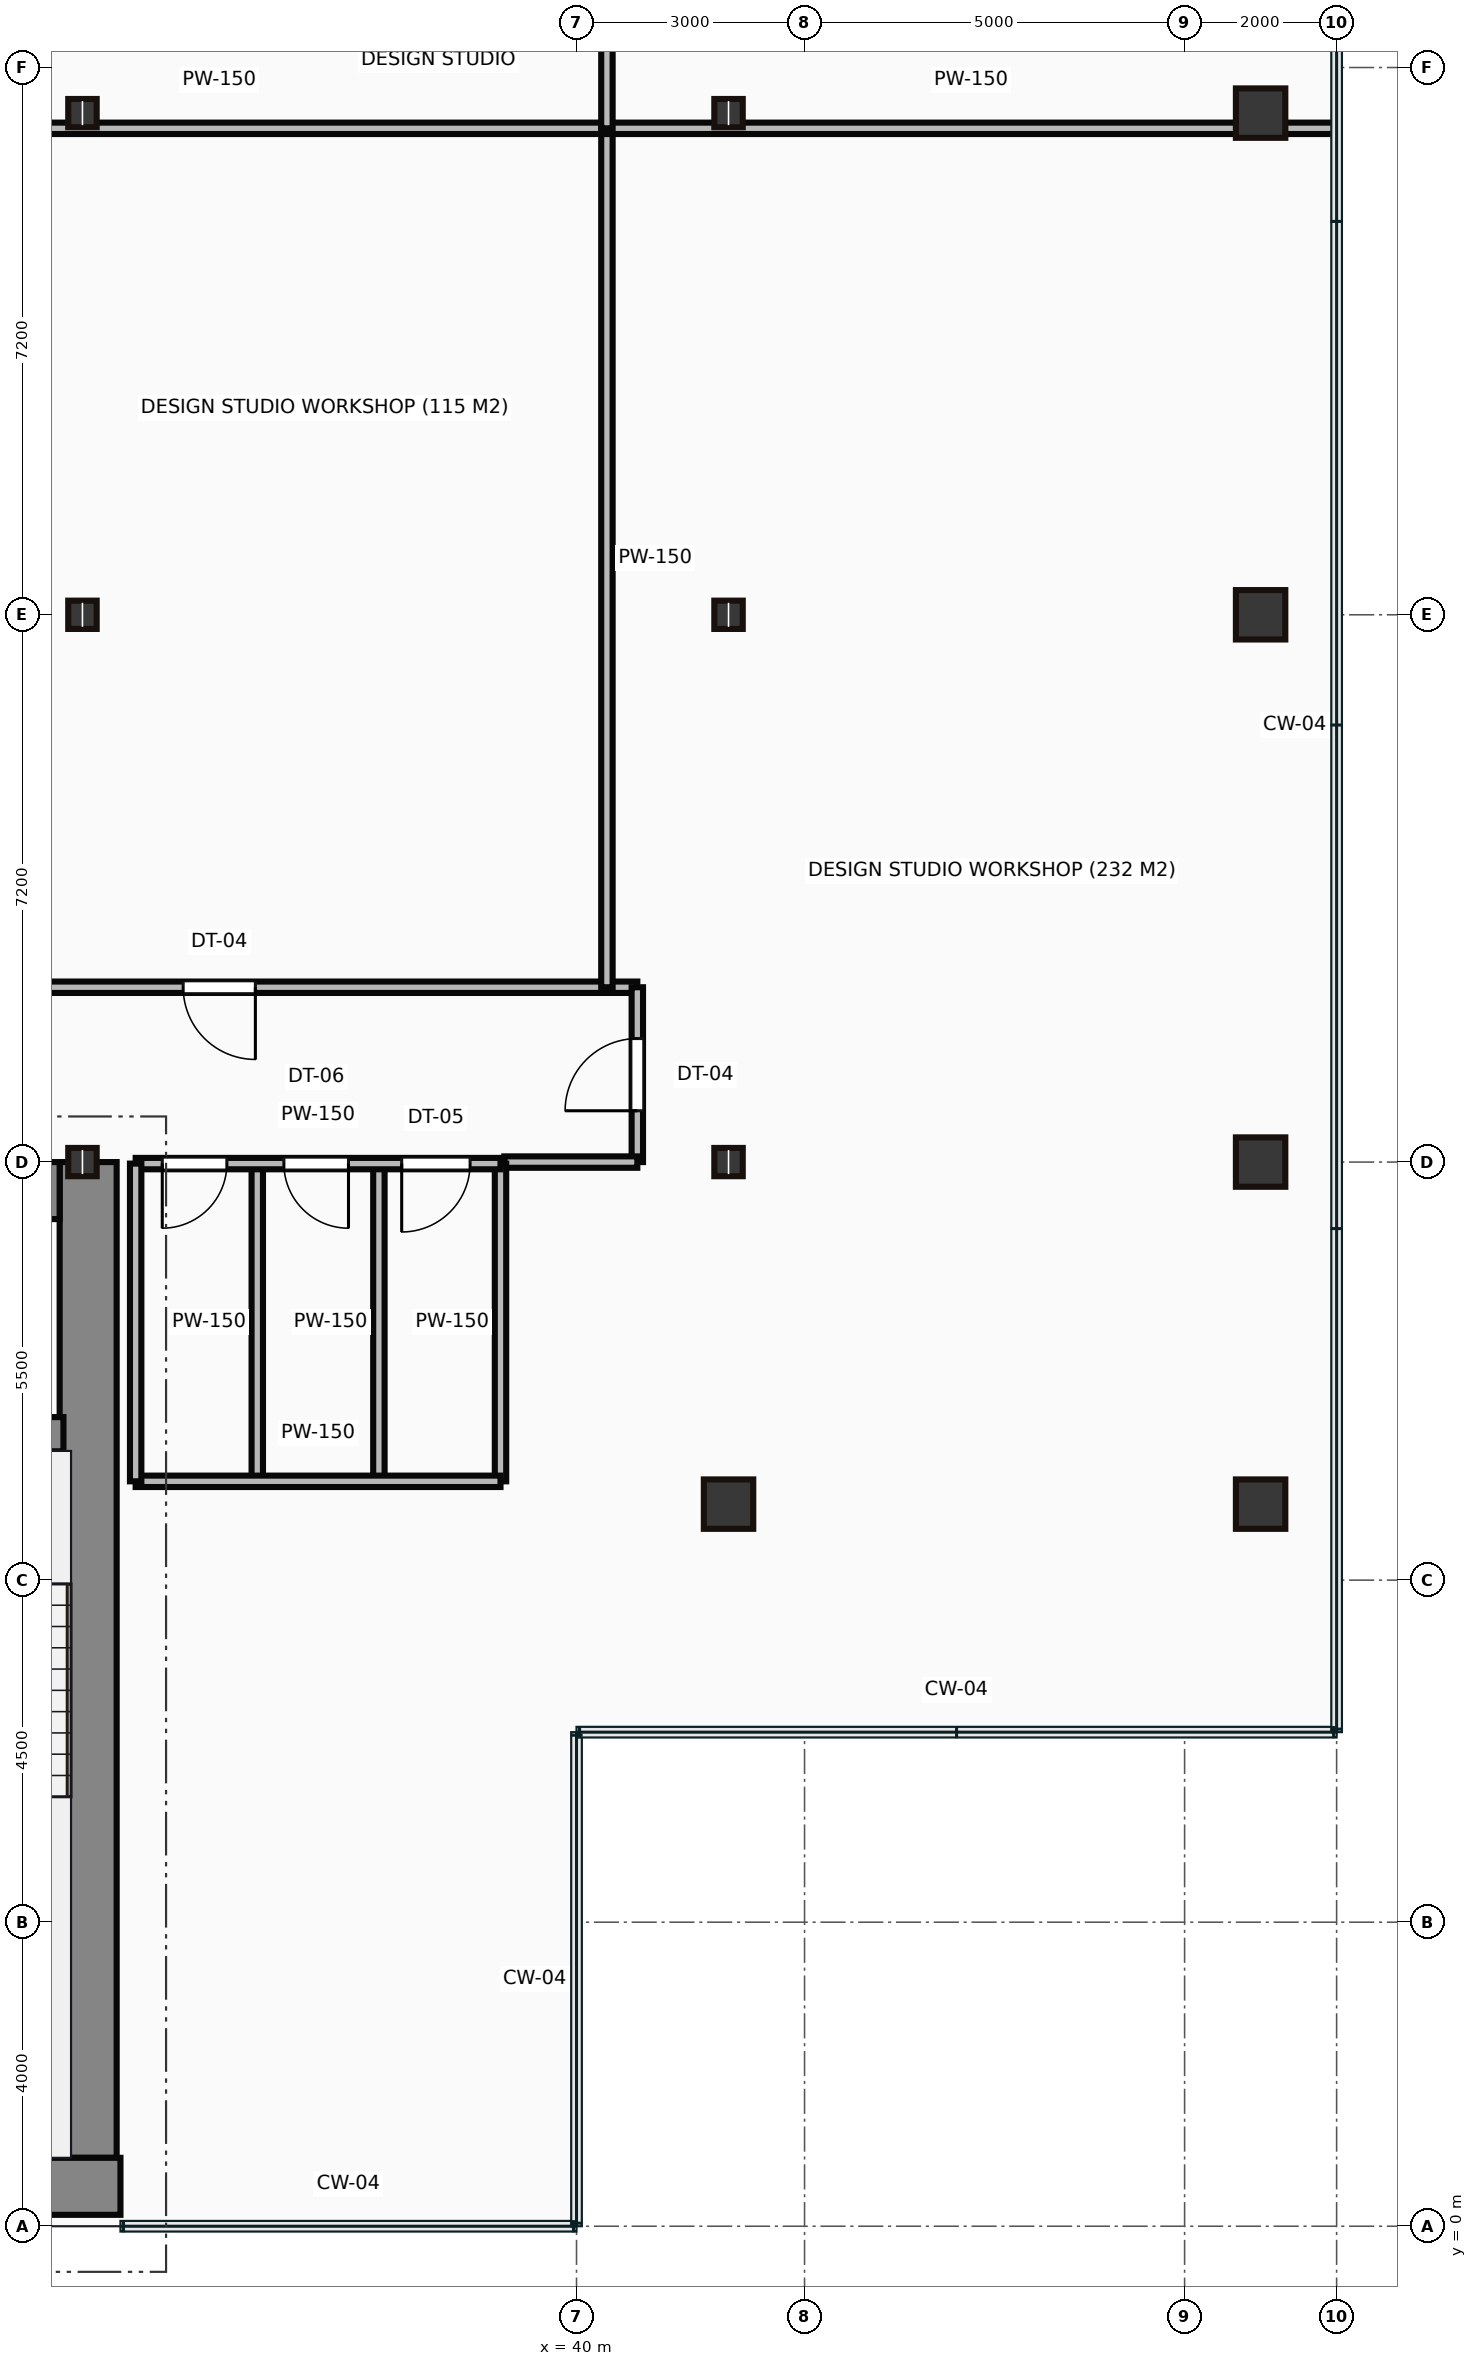
"""IFC4 building model, lengths in metres.
Left out: names, types, materials, properties, quantities, classifications, styles, units other than length and angle.
Written with IfcOpenShell. Run it as: python <this file> out.ifc"""

import sys

from ifc_helpers import new_model, si_unit, direction, frame, frame_2d, origin, origin_2d, place, context, subcontext, project, spatial, rectangle, hollow_rectangle, i_section, extrude, source, transform, mapped, element, fill, save


model = new_model("IFC4")
c1 = context("Model", 3, precision=1e-05, world=origin(), true_north=direction((0.0, 1.0)))
c2 = subcontext(c1, "Body", "Model", "MODEL_VIEW")
j1 = project(units=[si_unit("LENGTHUNIT", "METRE"), si_unit("PLANEANGLEUNIT", "RADIAN")], contexts=[c1])
p1 = place(None, origin())
s1 = spatial("IfcSite", under=j1, at=p1, CompositionType="ELEMENT")
p2 = place(p1, origin())
s2 = spatial("IfcBuilding", under=s1, at=p2, CompositionType="ELEMENT")
p3 = place(p2, frame((0.0, 0.0, 144.25)))
s3 = spatial("IfcBuildingStorey", under=s2, at=p3, CompositionType="ELEMENT", Elevation=144.25)
m1 = source(origin(), c2, "Body", "SweptSolid", [
    extrude(rectangle(XDim=29.5, YDim=0.75, at=frame_2d((14.75, 0.0))), origin(), (0.0, 0.0, 1.0), 3.65),
])
p4 = place(p3, frame((4.5, 0.525, 0.0), z_axis=(0.0, 0.0, 1.0), x_axis=(1.0, 0.0, 0.0)))
e1 = element("IfcWall", 1, at=p4, inside=s3, PredefinedType="SHEAR", context=c2, shape_type="MappedRepresentation", body=[
    mapped(m1, transform((0.0, 0.0, 0.0))),
])
m2 = source(origin(), c2, "Body", "SweptSolid", [
    extrude(rectangle(XDim=13.1, YDim=0.75, at=frame_2d((6.55, 0.0))), origin(), (0.0, 0.0, 1.0), 3.65),
])
p5 = place(p3, frame((33.575, 0.9, 0.0), z_axis=(0.0, 0.0, 1.0), x_axis=(0.0, 1.0, 0.0)))
e2 = element("IfcWall", 2, at=p5, inside=s3, PredefinedType="SHEAR", context=c2, shape_type="MappedRepresentation", body=[
    mapped(m2, transform((0.0, 0.0, 0.0))),
])
m3 = source(origin(), c2, "Body", "SweptSolid", [
    extrude(rectangle(XDim=12.6, YDim=0.75, at=frame_2d((6.3, 0.0))), origin(), (0.0, 0.0, 1.0), 3.65),
])
p6 = place(p3, frame((20.6, 13.625, 0.0), z_axis=(0.0, 0.0, 1.0), x_axis=(1.0, 0.0, 0.0)))
e3 = element("IfcWall", 3, at=p6, inside=s3, PredefinedType="SHEAR", context=c2, shape_type="MappedRepresentation", body=[
    mapped(m3, transform((0.0, 0.0, 0.0))),
])
p7 = place(p6, frame((9.25, 0.0, 0.0)))
e4 = element("IfcOpeningElement", 4, at=p7, cuts=e3, PredefinedType="OPENING", context=c2, shape_type="SweptSolid", body=[
    extrude(rectangle(XDim=1.1, YDim=2.15, at=frame_2d((0.55, 1.075))), frame((0.0, 0.385, 0.0), z_axis=(0.0, -1.0, 0.0), x_axis=(1.0, 0.0, 0.0)), (0.0, 0.0, 1.0), 0.77),
])
m4 = source(origin(), c2, "Body", "SweptSolid", [
    extrude(rectangle(XDim=3.39, YDim=0.45, at=frame_2d((1.695, 0.0))), origin(), (0.0, 0.0, 1.0), 3.65),
])
p8 = place(p3, frame((29.86, 10.42, 0.0), z_axis=(0.0, 0.0, 1.0), x_axis=(1.0, 0.0, 0.0)))
e5 = element("IfcWall", 5, at=p8, inside=s3, PredefinedType="SHEAR", context=c2, shape_type="MappedRepresentation", body=[
    mapped(m4, transform((0.0, 0.0, 0.0))),
])
p9 = place(p8, frame((1.1, 0.0, 0.0)))
e6 = element("IfcOpeningElement", 6, at=p9, cuts=e5, PredefinedType="OPENING", context=c2, shape_type="SweptSolid", body=[
    extrude(rectangle(XDim=1.1, YDim=2.15, at=frame_2d((0.55, 1.075))), frame((0.0, 0.235, 0.0), z_axis=(0.0, -1.0, 0.0), x_axis=(1.0, 0.0, 0.0)), (0.0, 0.0, 1.0), 0.47),
])
m5 = source(origin(), c2, "Body", "SweptSolid", [
    extrude(i_section(OverallWidth=0.374, OverallDepth=0.372, WebThickness=0.016, FlangeThickness=0.026, at=origin_2d()), origin(), (0.0, 0.0, 1.0), 3.65),
])
for number, where, z_axis, x_axis in (
    (7, (33.5, 14.0, 0.0), (0.0, 0.0, 1.0), (1.0, 0.0, 0.0)),
    (8, (33.5, 21.2, 0.0), (0.0, 0.0, 1.0), (1.0, 0.0, 0.0)),
    (9, (33.5, 27.8, 0.0), (0.0, 0.0, 1.0), (1.0, 0.0, 0.0)),
):
    element("IfcColumn", number, at=place(p3, frame(where, z_axis=z_axis, x_axis=x_axis)), inside=s3, PredefinedType="COLUMN", context=c2, shape_type="MappedRepresentation", body=[
        mapped(m5, transform((0.0, 0.0, 0.0))),
    ])
m6 = source(origin(), c2, "Body", "SweptSolid", [
    extrude(hollow_rectangle(XDim=0.65, YDim=0.65, WallThickness=0.032, at=origin_2d()), origin(), (0.0, 0.0, 1.0), 3.65),
])
p10 = place(p3, frame((42.0, 9.5, 0.0), z_axis=(0.0, 0.0, 1.0), x_axis=(1.0, 0.0, 0.0)))
e10 = element("IfcColumn", 10, at=p10, inside=s3, PredefinedType="COLUMN", context=c2, shape_type="MappedRepresentation", body=[
    mapped(m6, transform((0.0, 0.0, 0.0))),
])
for number, where, z_axis, x_axis in (
    (11, (42.0, 14.0, 0.0), (0.0, 0.0, 1.0), (1.0, 0.0, 0.0)),
    (12, (42.0, 21.2, 0.0), (0.0, 0.0, 1.0), (1.0, 0.0, 0.0)),
    (13, (42.0, 27.8, 0.0), (0.0, 0.0, 1.0), (1.0, 0.0, 0.0)),
):
    element("IfcColumn", number, at=place(p3, frame(where, z_axis=z_axis, x_axis=x_axis)), inside=s3, PredefinedType="COLUMN", context=c2, shape_type="MappedRepresentation", body=[
        mapped(m5, transform((0.0, 0.0, 0.0))),
    ])
for number, where, z_axis, x_axis in (
    (14, (49.0, 9.5, 0.0), (0.0, 0.0, 1.0), (1.0, 0.0, 0.0)),
    (15, (49.0, 14.0, 0.0), (0.0, 0.0, 1.0), (1.0, 0.0, 0.0)),
    (16, (49.0, 21.2, 0.0), (0.0, 0.0, 1.0), (1.0, 0.0, 0.0)),
    (17, (49.0, 27.8, 0.0), (0.0, 0.0, 1.0), (1.0, 0.0, 0.0)),
):
    element("IfcColumn", number, at=place(p3, frame(where, z_axis=z_axis, x_axis=x_axis)), inside=s3, PredefinedType="COLUMN", context=c2, shape_type="MappedRepresentation", body=[
        mapped(m6, transform((0.0, 0.0, 0.0))),
    ])
m7 = source(origin(), c2, "Body", "SweptSolid", [
    extrude(rectangle(XDim=4.8, YDim=0.15, at=frame_2d((2.4, 0.0))), origin(), (0.0, 0.0, 1.0), 2.76),
])
p11 = place(p3, frame((34.2, 13.98, 0.0), z_axis=(0.0, 0.0, 1.0), x_axis=(1.0, 0.0, 0.0)))
e18 = element("IfcWall", 18, at=p11, inside=s3, PredefinedType="PARTITIONING", context=c2, shape_type="MappedRepresentation", body=[
    mapped(m7, transform((0.0, 0.0, 0.0))),
])
p12 = place(p11, frame((0.35, 0.0, 0.0)))
e19 = element("IfcOpeningElement", 19, at=p12, cuts=e18, PredefinedType="OPENING", context=c2, shape_type="SweptSolid", body=[
    extrude(rectangle(XDim=0.85, YDim=2.1, at=frame_2d((0.425, 1.05))), frame((0.0, 0.085, 0.0), z_axis=(0.0, -1.0, 0.0), x_axis=(1.0, 0.0, 0.0)), (0.0, 0.0, 1.0), 0.17),
])
p13 = place(p11, frame((1.95, 0.0, 0.0)))
e20 = element("IfcOpeningElement", 20, at=p13, cuts=e18, PredefinedType="OPENING", context=c2, shape_type="SweptSolid", body=[
    extrude(rectangle(XDim=0.85, YDim=2.1, at=frame_2d((0.425, 1.05))), frame((0.0, 0.085, 0.0), z_axis=(0.0, -1.0, 0.0), x_axis=(1.0, 0.0, 0.0)), (0.0, 0.0, 1.0), 0.17),
])
p14 = place(p11, frame((3.5, 0.0, 0.0)))
e21 = element("IfcOpeningElement", 21, at=p14, cuts=e18, PredefinedType="OPENING", context=c2, shape_type="SweptSolid", body=[
    extrude(rectangle(XDim=0.9, YDim=2.1, at=frame_2d((0.45, 1.05))), frame((0.0, 0.085, 0.0), z_axis=(0.0, -1.0, 0.0), x_axis=(1.0, 0.0, 0.0)), (0.0, 0.0, 1.0), 0.17),
])
m8 = source(origin(), c2, "Body", "SweptSolid", [
    extrude(rectangle(XDim=4.8, YDim=0.15, at=frame_2d((2.4, 0.0))), origin(), (0.0, 0.0, 1.0), 3.4),
])
p15 = place(p3, frame((34.2, 9.8, 0.0), z_axis=(0.0, 0.0, 1.0), x_axis=(1.0, 0.0, 0.0)))
e22 = element("IfcWall", 22, at=p15, inside=s3, PredefinedType="PARTITIONING", context=c2, shape_type="MappedRepresentation", body=[
    mapped(m8, transform((0.0, 0.0, 0.0))),
])
m9 = source(origin(), c2, "Body", "SweptSolid", [
    extrude(rectangle(XDim=4.18, YDim=0.15, at=frame_2d((2.09, 0.0))), origin(), (0.0, 0.0, 1.0), 3.4),
])
for number, where, z_axis, x_axis in (
    (23, (39.0, 9.8, 0.0), (0.0, 0.0, 1.0), (0.0, 1.0, 0.0)),
    (24, (34.2, 9.8, 0.0), (0.0, 0.0, 1.0), (0.0, 1.0, 0.0)),
    (25, (35.8, 9.8, 0.0), (0.0, 0.0, 1.0), (0.0, 1.0, 0.0)),
    (26, (37.4, 9.8, 0.0), (0.0, 0.0, 1.0), (0.0, 1.0, 0.0)),
):
    element("IfcWall", number, at=place(p3, frame(where, z_axis=z_axis, x_axis=x_axis)), inside=s3, PredefinedType="PARTITIONING", context=c2, shape_type="MappedRepresentation", body=[
        mapped(m9, transform((0.0, 0.0, 0.0))),
    ])
m10 = source(origin(), c2, "Body", "SweptSolid", [
    extrude(rectangle(XDim=21.75, YDim=0.15, at=frame_2d((10.875, 0.0))), origin(), (0.0, 0.0, 1.0), 3.4),
])
p16 = place(p3, frame((19.05, 16.3, 0.0), z_axis=(0.0, 0.0, 1.0), x_axis=(1.0, 0.0, 0.0)))
e27 = element("IfcWall", 27, at=p16, inside=s3, PredefinedType="PARTITIONING", context=c2, shape_type="MappedRepresentation", body=[
    mapped(m10, transform((0.0, 0.0, 0.0))),
])
p17 = place(p16, frame((5.975, 0.0, 0.0)))
e28 = element("IfcOpeningElement", 28, at=p17, cuts=e27, PredefinedType="OPENING", context=c2, shape_type="SweptSolid", body=[
    extrude(rectangle(XDim=0.95, YDim=2.15, at=frame_2d((0.475, 1.075))), frame((0.0, 0.085, 0.0), z_axis=(0.0, -1.0, 0.0), x_axis=(1.0, 0.0, 0.0)), (0.0, 0.0, 1.0), 0.17),
])
p18 = place(p16, frame((15.775, 0.0, 0.0)))
e29 = element("IfcOpeningElement", 29, at=p18, cuts=e27, PredefinedType="OPENING", context=c2, shape_type="SweptSolid", body=[
    extrude(rectangle(XDim=0.95, YDim=2.15, at=frame_2d((0.475, 1.075))), frame((0.0, 0.085, 0.0), z_axis=(0.0, -1.0, 0.0), x_axis=(1.0, 0.0, 0.0)), (0.0, 0.0, 1.0), 0.17),
])
m11 = source(origin(), c2, "Body", "SweptSolid", [
    extrude(rectangle(XDim=2.3, YDim=0.15, at=frame_2d((1.15, 0.0))), origin(), (0.0, 0.0, 1.0), 3.4),
])
p19 = place(p3, frame((40.8, 16.3, 0.0), z_axis=(0.0, 0.0, 1.0), x_axis=(0.0, -1.0, 0.0)))
e30 = element("IfcWall", 30, at=p19, inside=s3, PredefinedType="PARTITIONING", context=c2, shape_type="MappedRepresentation", body=[
    mapped(m11, transform((0.0, 0.0, 0.0))),
])
p20 = place(p19, frame((0.675, 0.0, 0.0)))
e31 = element("IfcOpeningElement", 31, at=p20, cuts=e30, PredefinedType="OPENING", context=c2, shape_type="SweptSolid", body=[
    extrude(rectangle(XDim=0.95, YDim=2.15, at=frame_2d((0.475, 1.075))), frame((0.0, 0.085, 0.0), z_axis=(0.0, -1.0, 0.0), x_axis=(1.0, 0.0, 0.0)), (0.0, 0.0, 1.0), 0.17),
])
m12 = source(origin(), c2, "Body", "SweptSolid", [
    extrude(rectangle(XDim=1.75, YDim=0.15, at=frame_2d((0.875, 0.0))), origin(), (0.0, 0.0, 1.0), 2.76),
])
p21 = place(p3, frame((40.8, 14.0, 0.0), z_axis=(0.0, 0.0, 1.0), x_axis=(-1.0, 0.0, 0.0)))
e32 = element("IfcWall", 32, at=p21, inside=s3, PredefinedType="PARTITIONING", context=c2, shape_type="MappedRepresentation", body=[
    mapped(m12, transform((0.0, 0.0, 0.0))),
])
m13 = source(origin(), c2, "Body", "SweptSolid", [
    extrude(rectangle(XDim=10.2, YDim=0.15, at=frame_2d((5.1, 0.0))), origin(), (0.0, 0.0, 1.0), 3.4),
])
p22 = place(p3, frame((30.2, 27.6, 0.0), z_axis=(0.0, 0.0, 1.0), x_axis=(1.0, 0.0, 0.0)))
e33 = element("IfcWall", 33, at=p22, inside=s3, PredefinedType="PARTITIONING", context=c2, shape_type="MappedRepresentation", body=[
    mapped(m13, transform((0.0, 0.0, 0.0))),
])
m14 = source(origin(), c2, "Body", "SweptSolid", [
    extrude(rectangle(XDim=11.3, YDim=0.15, at=frame_2d((5.65, 0.0))), origin(), (0.0, 0.0, 1.0), 3.4),
])
p23 = place(p3, frame((40.4, 27.6, 0.0), z_axis=(0.0, 0.0, 1.0), x_axis=(0.0, -1.0, 0.0)))
e34 = element("IfcWall", 34, at=p23, inside=s3, PredefinedType="PARTITIONING", context=c2, shape_type="MappedRepresentation", body=[
    mapped(m14, transform((0.0, 0.0, 0.0))),
])
m15 = source(origin(), c2, "Body", "SweptSolid", [
    extrude(rectangle(XDim=9.58, YDim=0.15, at=frame_2d((4.79, 0.0))), origin(), (0.0, 0.0, 1.0), 3.4),
])
p24 = place(p3, frame((40.4, 27.6, 0.0), z_axis=(0.0, 0.0, 1.0), x_axis=(1.0, 0.0, 0.0)))
e35 = element("IfcWall", 35, at=p24, inside=s3, PredefinedType="PARTITIONING", context=c2, shape_type="MappedRepresentation", body=[
    mapped(m15, transform((0.0, 0.0, 0.0))),
])
m16 = source(origin(), c2, "Body", "SweptSolid", [
    extrude(rectangle(XDim=1.8, YDim=0.15, at=frame_2d((0.9, 0.0))), origin(), (0.0, 0.0, 1.0), 3.4),
])
p25 = place(p3, frame((40.4, 29.4, 0.0), z_axis=(0.0, 0.0, 1.0), x_axis=(0.0, -1.0, 0.0)))
e36 = element("IfcWall", 36, at=p25, inside=s3, PredefinedType="PARTITIONING", context=c2, shape_type="MappedRepresentation", body=[
    mapped(m16, transform((0.0, 0.0, 0.0))),
])
m17 = source(origin(), c2, "Body", "SweptSolid", [
    extrude(rectangle(XDim=0.85, YDim=2.1, at=frame_2d((0.425, 1.05))), frame((0.0, 0.025, 0.0), z_axis=(0.0, -1.0, 0.0), x_axis=(1.0, 0.0, 0.0)), (0.0, 0.0, 1.0), 0.05),
])
p26 = place(p12, frame((0.85, 0.0, 0.0), z_axis=(0.0, 0.0, 1.0), x_axis=(-1.0, 0.0, 0.0)))
e37 = element("IfcDoor", 37, at=p26, inside=s3, OperationType="SINGLE_SWING_LEFT", PredefinedType="DOOR", context=c2, shape_type="MappedRepresentation", body=[
    mapped(m17, transform((0.0, 0.0, 0.0))),
])
fill(e19, e37)
p27 = place(p13, frame((0.85, 0.0, 0.0), z_axis=(0.0, 0.0, 1.0), x_axis=(-1.0, 0.0, 0.0)))
e38 = element("IfcDoor", 38, at=p27, inside=s3, OperationType="SINGLE_SWING_RIGHT", PredefinedType="DOOR", context=c2, shape_type="MappedRepresentation", body=[
    mapped(m17, transform((0.0, 0.0, 0.0))),
])
fill(e20, e38)
m18 = source(origin(), c2, "Body", "SweptSolid", [
    extrude(rectangle(XDim=0.9, YDim=2.1, at=frame_2d((0.45, 1.05))), frame((0.0, 0.025, 0.0), z_axis=(0.0, -1.0, 0.0), x_axis=(1.0, 0.0, 0.0)), (0.0, 0.0, 1.0), 0.05),
])
p28 = place(p14, frame((0.9, 0.0, 0.0), z_axis=(0.0, 0.0, 1.0), x_axis=(-1.0, 0.0, 0.0)))
e39 = element("IfcDoor", 39, at=p28, inside=s3, OperationType="SINGLE_SWING_LEFT", PredefinedType="DOOR", context=c2, shape_type="MappedRepresentation", body=[
    mapped(m18, transform((0.0, 0.0, 0.0))),
])
fill(e21, e39)
m19 = source(origin(), c2, "Body", "SweptSolid", [
    extrude(rectangle(XDim=0.95, YDim=2.15, at=frame_2d((0.475, 1.075))), frame((0.0, 0.025, 0.0), z_axis=(0.0, -1.0, 0.0), x_axis=(1.0, 0.0, 0.0)), (0.0, 0.0, 1.0), 0.05),
])
p29 = place(p18, origin())
e40 = element("IfcDoor", 40, at=p29, inside=s3, OperationType="SINGLE_SWING_RIGHT", PredefinedType="DOOR", context=c2, shape_type="MappedRepresentation", body=[
    mapped(m19, transform((0.0, 0.0, 0.0))),
])
fill(e29, e40)
p30 = place(p20, origin())
e41 = element("IfcDoor", 41, at=p30, inside=s3, OperationType="SINGLE_SWING_RIGHT", PredefinedType="DOOR", context=c2, shape_type="MappedRepresentation", body=[
    mapped(m19, transform((0.0, 0.0, 0.0))),
])
fill(e31, e41)
save(model, sys.argv[1])
